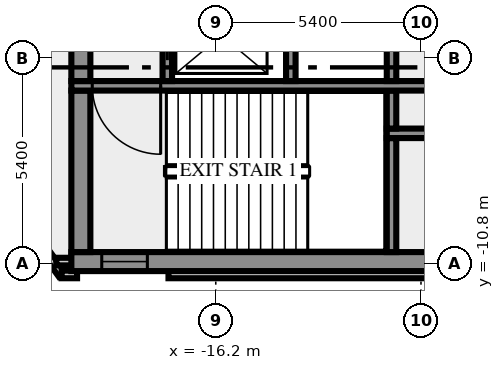
"""IFC4 building model, lengths in metres.
Left out: names, types, materials, properties, quantities, classifications, styles, units other than length and angle.
Written with IfcOpenShell. Run it as: python <this file> out.ifc"""

import sys

from ifc_helpers import new_model, si_unit, direction, frame, frame_2d, origin, place, context, subcontext, project, spatial, rectangle, extrude, element, fill, save


model = new_model("IFC4")
c1 = context("Model", 3, precision=1e-05, world=origin(), true_north=direction((0.0, 1.0)))
c2 = subcontext(c1, "Body", "Model", "MODEL_VIEW")
j1 = project(units=[si_unit("LENGTHUNIT", "METRE"), si_unit("PLANEANGLEUNIT", "RADIAN")], contexts=[c1])
p1 = place(None, origin())
s1 = spatial("IfcSite", under=j1, at=p1, CompositionType="ELEMENT")
p2 = place(p1, origin())
s2 = spatial("IfcBuilding", under=s1, at=p2, CompositionType="ELEMENT")
p3 = place(p2, frame((0.0, 0.0, 214.0)))
s3 = spatial("IfcBuildingStorey", under=s2, at=p3, CompositionType="ELEMENT", Elevation=214.0)
p4 = place(p3, frame((-21.833, -8.909, 0.0), z_axis=(0.0, 0.0, 1.0), x_axis=(0.587766567315, -0.809030569476, 0.0)))
e1 = element("IfcWall", 1, at=p4, inside=s3, PredefinedType="SOLIDWALL", context=c2, shape_type="SweptSolid", body=[
    extrude(rectangle(XDim=2.688, YDim=0.2, at=frame_2d((1.344, 0.0))), origin(), (0.0, 0.0, 1.0), 3.65),
])
p5 = place(p3, frame((-20.256, -11.088, 0.0), z_axis=(0.0, 0.0, 1.0), x_axis=(1.0, 0.0, 0.0)))
e2 = element("IfcWall", 2, at=p5, inside=s3, PredefinedType="SOLIDWALL", context=c2, shape_type="SweptSolid", body=[
    extrude(rectangle(XDim=0.406, YDim=0.2, at=frame_2d((0.203, 0.0))), origin(), (0.0, 0.0, 1.0), 3.65),
])
p6 = place(p3, frame((-17.444, -11.088, 0.0), z_axis=(0.0, 0.0, 1.0), x_axis=(1.0, 0.0, 0.0)))
e3 = element("IfcWall", 3, at=p6, inside=s3, PredefinedType="SOLIDWALL", context=c2, shape_type="SweptSolid", body=[
    extrude(rectangle(XDim=34.888, YDim=0.2, at=frame_2d((17.444, 0.0))), origin(), (0.0, 0.0, 1.0), 3.65),
])
p7 = place(p3, frame((-19.98, -10.75, 0.0), z_axis=(0.0, 0.0, 1.0), x_axis=(-1.0, 0.0, 0.0)))
e4 = element("IfcWall", 4, at=p7, inside=s3, PredefinedType="SOLIDWALL", context=c2, shape_type="SweptSolid", body=[
    extrude(rectangle(XDim=0.417, YDim=0.2, at=frame_2d((0.208, 0.0))), origin(), (0.0, 0.0, 1.0), 3.65),
])
p8 = place(p3, frame((-20.0, -10.75, 0.0), z_axis=(0.0, 0.0, 1.0), x_axis=(1.0, 0.0, 0.0)))
e5 = element("IfcWall", 5, at=p8, inside=s3, PredefinedType="SHEAR", context=c2, shape_type="SweptSolid", body=[
    extrude(rectangle(XDim=40.0, YDim=0.5, at=frame_2d((20.0, 0.0))), origin(), (0.0, 0.0, 1.0), 3.65),
])
p9 = place(p8, frame((0.8, 0.0, 1.0)))
e6 = element("IfcOpeningElement", 6, at=p9, cuts=e5, PredefinedType="OPENING", context=c2, shape_type="SweptSolid", body=[
    extrude(rectangle(XDim=1.2, YDim=1.2, at=frame_2d((0.6, 0.6))), frame((0.0, 0.26, 0.0), z_axis=(0.0, -1.0, 0.0), x_axis=(1.0, 0.0, 0.0)), (0.0, 0.0, 1.0), 0.52),
])
p10 = place(p8, frame((38.0, 0.0, 1.0)))
e7 = element("IfcOpeningElement", 7, at=p10, cuts=e5, PredefinedType="OPENING", context=c2, shape_type="SweptSolid", body=[
    extrude(rectangle(XDim=1.2, YDim=1.2, at=frame_2d((0.6, 0.6))), frame((0.0, 0.26, 0.0), z_axis=(0.0, -1.0, 0.0), x_axis=(1.0, 0.0, 0.0)), (0.0, 0.0, 1.0), 0.52),
])
p11 = place(p3, frame((-19.75, -10.5, 0.0), z_axis=(0.0, 0.0, 1.0), x_axis=(0.0, 1.0, 0.0)))
e8 = element("IfcWall", 8, at=p11, inside=s3, PredefinedType="SHEAR", context=c2, shape_type="SweptSolid", body=[
    extrude(rectangle(XDim=4.25, YDim=0.5, at=frame_2d((2.125, 0.0))), origin(), (0.0, 0.0, 1.0), 3.65),
])
p12 = place(p3, frame((-11.575, -10.5, 0.0), z_axis=(0.0, 0.0, 1.0), x_axis=(0.0, 1.0, 0.0)))
e9 = element("IfcWall", 9, at=p12, inside=s3, PredefinedType="SHEAR", context=c2, shape_type="SweptSolid", body=[
    extrude(rectangle(XDim=3.0, YDim=0.25, at=frame_2d((1.5, 0.0))), origin(), (0.0, 0.0, 1.0), 3.65),
])
p13 = place(p3, frame((11.7, -7.375, 0.0), z_axis=(0.0, 0.0, 1.0), x_axis=(-1.0, 0.0, 0.0)))
e10 = element("IfcWall", 10, at=p13, inside=s3, PredefinedType="SHEAR", context=c2, shape_type="SweptSolid", body=[
    extrude(rectangle(XDim=23.4, YDim=0.25, at=frame_2d((11.7, 0.0))), origin(), (0.0, 0.0, 1.0), 3.65),
])
p14 = place(p13, frame((21.312, 0.0, 0.0)))
e11 = element("IfcOpeningElement", 11, at=p14, cuts=e10, PredefinedType="OPENING", context=c2, shape_type="SweptSolid", body=[
    extrude(rectangle(XDim=0.9, YDim=2.1, at=frame_2d((0.45, 1.05))), frame((0.0, 0.135, 0.0), z_axis=(0.0, -1.0, 0.0), x_axis=(1.0, 0.0, 0.0)), (0.0, 0.0, 1.0), 0.27),
])
p15 = place(p13, frame((18.65, 0.0, 0.0)))
e12 = element("IfcOpeningElement", 12, at=p15, cuts=e10, PredefinedType="OPENING", context=c2, shape_type="SweptSolid", body=[
    extrude(rectangle(XDim=0.9, YDim=2.1, at=frame_2d((0.45, 1.05))), frame((0.0, 0.135, 0.0), z_axis=(0.0, -1.0, 0.0), x_axis=(1.0, 0.0, 0.0)), (0.0, 0.0, 1.0), 0.27),
])
p16 = place(p13, frame((16.388, 0.0, 0.0)))
e13 = element("IfcOpeningElement", 13, at=p16, cuts=e10, PredefinedType="OPENING", context=c2, shape_type="SweptSolid", body=[
    extrude(rectangle(XDim=0.9, YDim=2.1, at=frame_2d((0.45, 1.05))), frame((0.0, 0.135, 0.0), z_axis=(0.0, -1.0, 0.0), x_axis=(1.0, 0.0, 0.0)), (0.0, 0.0, 1.0), 0.27),
])
p17 = place(p13, frame((14.65, 0.0, 0.0)))
e14 = element("IfcOpeningElement", 14, at=p17, cuts=e10, PredefinedType="OPENING", context=c2, shape_type="SweptSolid", body=[
    extrude(rectangle(XDim=0.7, YDim=2.1, at=frame_2d((0.35, 1.05))), frame((0.0, 0.135, 0.0), z_axis=(0.0, -1.0, 0.0), x_axis=(1.0, 0.0, 0.0)), (0.0, 0.0, 1.0), 0.27),
])
p18 = place(p13, frame((13.35, 0.0, 0.0)))
e15 = element("IfcOpeningElement", 15, at=p18, cuts=e10, PredefinedType="OPENING", context=c2, shape_type="SweptSolid", body=[
    extrude(rectangle(XDim=0.9, YDim=2.1, at=frame_2d((0.45, 1.05))), frame((0.0, 0.135, 0.0), z_axis=(0.0, -1.0, 0.0), x_axis=(1.0, 0.0, 0.0)), (0.0, 0.0, 1.0), 0.27),
])
p19 = place(p13, frame((11.975, 0.0, 0.0)))
e16 = element("IfcOpeningElement", 16, at=p19, cuts=e10, PredefinedType="OPENING", context=c2, shape_type="SweptSolid", body=[
    extrude(rectangle(XDim=0.9, YDim=2.1, at=frame_2d((0.45, 1.05))), frame((0.0, 0.135, 0.0), z_axis=(0.0, -1.0, 0.0), x_axis=(1.0, 0.0, 0.0)), (0.0, 0.0, 1.0), 0.27),
])
p20 = place(p13, frame((10.5, 0.0, 0.0)))
e17 = element("IfcOpeningElement", 17, at=p20, cuts=e10, PredefinedType="OPENING", context=c2, shape_type="SweptSolid", body=[
    extrude(rectangle(XDim=0.9, YDim=2.1, at=frame_2d((0.45, 1.05))), frame((0.0, 0.135, 0.0), z_axis=(0.0, -1.0, 0.0), x_axis=(1.0, 0.0, 0.0)), (0.0, 0.0, 1.0), 0.27),
])
p21 = place(p13, frame((8.35, 0.0, 0.0)))
e18 = element("IfcOpeningElement", 18, at=p21, cuts=e10, PredefinedType="OPENING", context=c2, shape_type="SweptSolid", body=[
    extrude(rectangle(XDim=1.1, YDim=2.1, at=frame_2d((0.55, 1.05))), frame((0.0, 0.135, 0.0), z_axis=(0.0, -1.0, 0.0), x_axis=(1.0, 0.0, 0.0)), (0.0, 0.0, 1.0), 0.27),
])
p22 = place(p13, frame((5.85, 0.0, 0.0)))
e19 = element("IfcOpeningElement", 19, at=p22, cuts=e10, PredefinedType="OPENING", context=c2, shape_type="SweptSolid", body=[
    extrude(rectangle(XDim=1.1, YDim=2.1, at=frame_2d((0.55, 1.05))), frame((0.0, 0.135, 0.0), z_axis=(0.0, -1.0, 0.0), x_axis=(1.0, 0.0, 0.0)), (0.0, 0.0, 1.0), 0.27),
])
p23 = place(p13, frame((3.35, 0.0, 0.0)))
e20 = element("IfcOpeningElement", 20, at=p23, cuts=e10, PredefinedType="OPENING", context=c2, shape_type="SweptSolid", body=[
    extrude(rectangle(XDim=1.1, YDim=2.1, at=frame_2d((0.55, 1.05))), frame((0.0, 0.135, 0.0), z_axis=(0.0, -1.0, 0.0), x_axis=(1.0, 0.0, 0.0)), (0.0, 0.0, 1.0), 0.27),
])
p24 = place(p13, frame((0.85, 0.0, 0.0)))
e21 = element("IfcOpeningElement", 21, at=p24, cuts=e10, PredefinedType="OPENING", context=c2, shape_type="SweptSolid", body=[
    extrude(rectangle(XDim=1.1, YDim=2.1, at=frame_2d((0.55, 1.05))), frame((0.0, 0.135, 0.0), z_axis=(0.0, -1.0, 0.0), x_axis=(1.0, 0.0, 0.0)), (0.0, 0.0, 1.0), 0.27),
])
p25 = place(p3, frame((-11.575, -7.25, 0.0), z_axis=(0.0, 0.0, 1.0), x_axis=(0.0, 1.0, 0.0)))
e22 = element("IfcWall", 22, at=p25, inside=s3, PredefinedType="SHEAR", context=c2, shape_type="SweptSolid", body=[
    extrude(rectangle(XDim=1.0, YDim=0.25, at=frame_2d((0.5, 0.0))), origin(), (0.0, 0.0, 1.0), 3.65),
])
p26 = place(p3, frame((-9.2, -6.125, 0.0), z_axis=(0.0, 0.0, 1.0), x_axis=(-1.0, 0.0, 0.0)))
e23 = element("IfcWall", 23, at=p26, inside=s3, PredefinedType="SHEAR", context=c2, shape_type="SweptSolid", body=[
    extrude(rectangle(XDim=10.8, YDim=0.25, at=frame_2d((5.4, 0.0))), origin(), (0.0, 0.0, 1.0), 3.65),
])
p27 = place(p26, frame((8.45, 0.0, 0.0)))
e24 = element("IfcOpeningElement", 24, at=p27, cuts=e23, PredefinedType="OPENING", context=c2, shape_type="SweptSolid", body=[
    extrude(rectangle(XDim=1.8, YDim=2.1, at=frame_2d((0.9, 1.05))), frame((0.0, 0.135, 0.0), z_axis=(0.0, -1.0, 0.0), x_axis=(1.0, 0.0, 0.0)), (0.0, 0.0, 1.0), 0.27),
])
p28 = place(p3, frame((-19.75, -6.0, 0.0), z_axis=(0.0, 0.0, 1.0), x_axis=(0.0, 1.0, 0.0)))
e25 = element("IfcWall", 25, at=p28, inside=s3, PredefinedType="SHEAR", context=c2, shape_type="SweptSolid", body=[
    extrude(rectangle(XDim=4.3, YDim=0.5, at=frame_2d((2.15, 0.0))), origin(), (0.0, 0.0, 1.0), 3.65),
])
p29 = place(p3, frame((-17.475, -6.0, 0.0), z_axis=(0.0, 0.0, 1.0), x_axis=(0.0, 1.0, 0.0)))
e26 = element("IfcWall", 26, at=p29, inside=s3, PredefinedType="SHEAR", context=c2, shape_type="SweptSolid", body=[
    extrude(rectangle(XDim=4.3, YDim=0.25, at=frame_2d((2.15, 0.0))), origin(), (0.0, 0.0, 1.0), 3.65),
])
p30 = place(p29, frame((0.55, 0.0, 0.0)))
e27 = element("IfcOpeningElement", 27, at=p30, cuts=e26, PredefinedType="OPENING", context=c2, shape_type="SweptSolid", body=[
    extrude(rectangle(XDim=1.3, YDim=2.1, at=frame_2d((0.65, 1.05))), frame((0.0, 0.135, 0.0), z_axis=(0.0, -1.0, 0.0), x_axis=(1.0, 0.0, 0.0)), (0.0, 0.0, 1.0), 0.27),
])
p31 = place(p3, frame((-14.225, -6.0, 0.0), z_axis=(0.0, 0.0, 1.0), x_axis=(0.0, 1.0, 0.0)))
e28 = element("IfcWall", 28, at=p31, inside=s3, PredefinedType="SHEAR", context=c2, shape_type="SweptSolid", body=[
    extrude(rectangle(XDim=4.3, YDim=0.25, at=frame_2d((2.15, 0.0))), origin(), (0.0, 0.0, 1.0), 3.65),
])
p32 = place(p3, frame((-11.575, -6.0, 0.0), z_axis=(0.0, 0.0, 1.0), x_axis=(0.0, 1.0, 0.0)))
e29 = element("IfcWall", 29, at=p32, inside=s3, PredefinedType="SHEAR", context=c2, shape_type="SweptSolid", body=[
    extrude(rectangle(XDim=1.75, YDim=0.25, at=frame_2d((0.875, 0.0))), origin(), (0.0, 0.0, 1.0), 3.65),
])
p33 = place(p9, origin())
e30 = element("IfcWindow", 30, at=p33, inside=s3, PartitioningType="SINGLE_PANEL", PredefinedType="WINDOW", context=c2, shape_type="SweptSolid", body=[
    extrude(rectangle(XDim=1.2, YDim=1.2, at=frame_2d((0.6, 0.6))), frame((0.0, 0.03, 0.0), z_axis=(0.0, -1.0, 0.0), x_axis=(1.0, 0.0, 0.0)), (0.0, 0.0, 1.0), 0.06),
])
fill(e6, e30)
p34 = place(p27, origin())
e31 = element("IfcDoor", 31, at=p34, inside=s3, OperationType="DOUBLE_DOOR_SINGLE_SWING", PredefinedType="DOOR", context=c2, shape_type="SweptSolid", body=[
    extrude(rectangle(XDim=1.8, YDim=2.1, at=frame_2d((0.9, 1.05))), frame((0.0, 0.025, 0.0), z_axis=(0.0, -1.0, 0.0), x_axis=(1.0, 0.0, 0.0)), (0.0, 0.0, 1.0), 0.05),
])
fill(e24, e31)
p35 = place(p30, origin())
e32 = element("IfcDoor", 32, at=p35, inside=s3, OperationType="DOUBLE_DOOR_SLIDING", PredefinedType="DOOR", context=c2, shape_type="SweptSolid", body=[
    extrude(rectangle(XDim=1.3, YDim=2.1, at=frame_2d((0.65, 1.05))), frame((0.0, 0.025, 0.0), z_axis=(0.0, -1.0, 0.0), x_axis=(1.0, 0.0, 0.0)), (0.0, 0.0, 1.0), 0.05),
])
fill(e27, e32)
save(model, sys.argv[1])
